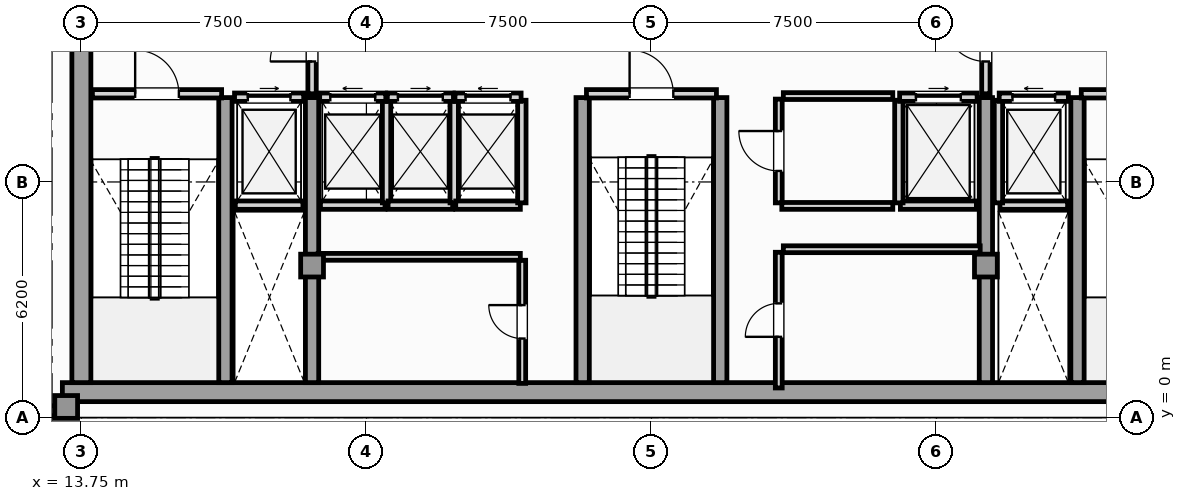
"""IFC4 building model, lengths in metres.
Left out: names, types, materials, properties, quantities, classifications, styles, units other than length and angle.
Written with IfcOpenShell. Run it as: python <this file> out.ifc"""

import sys

from ifc_helpers import new_model, si_unit, direction, frame, frame_2d, origin, origin_2d, place, context, subcontext, project, spatial, rectangle, extrude, element, fill, save


model = new_model("IFC4")
c1 = context("Model", 3, precision=1e-05, world=origin(), true_north=direction((0.0, 1.0)))
c2 = subcontext(c1, "Body", "Model", "MODEL_VIEW")
j1 = project(units=[si_unit("LENGTHUNIT", "METRE"), si_unit("PLANEANGLEUNIT", "RADIAN")], contexts=[c1])
p1 = place(None, origin())
s1 = spatial("IfcSite", under=j1, at=p1, CompositionType="ELEMENT")
p2 = place(p1, origin())
s2 = spatial("IfcBuilding", under=s1, at=p2, CompositionType="ELEMENT")
p3 = place(p2, frame((0.0, 0.0, 308.0)))
s3 = spatial("IfcBuildingStorey", under=s2, at=p3, CompositionType="ELEMENT", Elevation=308.0)
p4 = place(p3, frame((13.25, 0.67, 0.0), z_axis=(0.0, 0.0, 1.0), x_axis=(1.0, 0.0, 0.0)))
e1 = element("IfcWall", 1, at=p4, inside=s3, PredefinedType="SHEAR", context=c2, shape_type="SweptSolid", body=[
    extrude(rectangle(XDim=31.0, YDim=0.5, at=frame_2d((15.5, 0.0))), origin(), (0.0, 0.0, 1.0), 4.85),
])
p5 = place(p3, frame((13.75, 0.92, 0.0), z_axis=(0.0, 0.0, 1.0), x_axis=(0.0, 1.0, 0.0)))
e2 = element("IfcWall", 2, at=p5, inside=s3, PredefinedType="SHEAR", context=c2, shape_type="SweptSolid", body=[
    extrude(rectangle(XDim=10.53, YDim=0.5, at=frame_2d((5.265, 0.0))), origin(), (0.0, 0.0, 1.0), 4.85),
])
for number, where, z_axis, x_axis in (
    (3, (17.54, 0.92, 0.0), (0.0, 0.0, 1.0), (0.0, 1.0, 0.0)),
    (4, (19.82, 0.92, 0.0), (0.0, 0.0, 1.0), (0.0, 1.0, 0.0)),
    (5, (26.94, 0.92, 0.0), (0.0, 0.0, 1.0), (0.0, 1.0, 0.0)),
    (6, (30.56, 0.92, 0.0), (0.0, 0.0, 1.0), (0.0, 1.0, 0.0)),
    (7, (37.55, 0.92, 0.0), (0.0, 0.0, 1.0), (0.0, 1.0, 0.0)),
    (8, (39.96, 0.92, 0.0), (0.0, 0.0, 1.0), (0.0, 1.0, 0.0)),
):
    element("IfcWall", number, at=place(p3, frame(where, z_axis=z_axis, x_axis=x_axis)), inside=s3, PredefinedType="SHEAR", context=c2, shape_type="SweptSolid", body=[
        extrude(rectangle(XDim=7.5, YDim=0.35, at=frame_2d((3.75, 0.0))), origin(), (0.0, 0.0, 1.0), 4.85),
    ])
for number, where, z_axis, x_axis in (
    (9, (13.35, 0.28, 0.0), (0.0, 0.0, 1.0), (1.0, 0.0, 0.0)),
    (10, (19.82, 4.0, 0.0), (0.0, 0.0, 1.0), (1.0, 0.0, 0.0)),
    (11, (37.55, 4.0, 0.0), (0.0, 0.0, 1.0), (1.0, 0.0, 0.0)),
):
    element("IfcColumn", number, at=place(p3, frame(where, z_axis=z_axis, x_axis=x_axis)), inside=s3, PredefinedType="COLUMN", context=c2, shape_type="SweptSolid", body=[
        extrude(rectangle(XDim=0.6, YDim=0.6, at=origin_2d()), origin(), (0.0, 0.0, 1.0), 5.05),
    ])
p6 = place(p3, frame((12.091, 0.18, 0.0), z_axis=(0.0, 0.0, 1.0), x_axis=(1.0, 0.0, 0.0)))
e12 = element("IfcWall", 12, at=p6, inside=s3, PredefinedType="SOLIDWALL", context=c2, shape_type="SweptSolid", body=[
    extrude(rectangle(XDim=1.159, YDim=0.26, at=frame_2d((0.58, 0.0))), origin(), (0.0, 0.0, 1.0), 4.85),
])
p7 = place(p3, frame((17.8, 5.59, 0.0), z_axis=(0.0, 0.0, 1.0), x_axis=(1.0, 0.0, 0.0)))
e13 = element("IfcWall", 13, at=p7, inside=s3, PredefinedType="SOLIDWALL", context=c2, shape_type="SweptSolid", body=[
    extrude(rectangle(XDim=1.78, YDim=0.22, at=frame_2d((0.89, 0.0))), origin(), (0.0, 0.0, 1.0), 4.85),
])
p8 = place(p3, frame((17.78, 8.43, 0.0), z_axis=(0.0, 0.0, 1.0), x_axis=(1.0, 0.0, 0.0)))
e14 = element("IfcWall", 14, at=p8, inside=s3, PredefinedType="SOLIDWALL", context=c2, shape_type="SweptSolid", body=[
    extrude(rectangle(XDim=1.82, YDim=0.22, at=frame_2d((0.91, 0.0))), origin(), (0.0, 0.0, 1.0), 4.85),
])
p9 = place(p8, frame((0.35, 0.0, 0.0)))
e15 = element("IfcOpeningElement", 15, at=p9, cuts=e14, PredefinedType="OPENING", context=c2, shape_type="SweptSolid", body=[
    extrude(rectangle(XDim=1.12, YDim=2.25, at=frame_2d((0.56, 1.125))), frame((0.0, 0.12, 0.0), z_axis=(0.0, -1.0, 0.0), x_axis=(1.0, 0.0, 0.0)), (0.0, 0.0, 1.0), 0.24),
])
p10 = place(p3, frame((37.92, 5.59, 0.0), z_axis=(0.0, 0.0, 1.0), x_axis=(1.0, 0.0, 0.0)))
e16 = element("IfcWall", 16, at=p10, inside=s3, PredefinedType="SOLIDWALL", context=c2, shape_type="SweptSolid", body=[
    extrude(rectangle(XDim=1.78, YDim=0.22, at=frame_2d((0.89, 0.0))), origin(), (0.0, 0.0, 1.0), 4.85),
])
p11 = place(p3, frame((37.88, 5.65, 0.0), z_axis=(0.0, 0.0, 1.0), x_axis=(0.0, 1.0, 0.0)))
e17 = element("IfcWall", 17, at=p11, inside=s3, PredefinedType="SOLIDWALL", context=c2, shape_type="SweptSolid", body=[
    extrude(rectangle(XDim=2.7, YDim=0.22, at=frame_2d((1.35, 0.0))), origin(), (0.0, 0.0, 1.0), 4.85),
])
p12 = place(p3, frame((37.9, 8.43, 0.0), z_axis=(0.0, 0.0, 1.0), x_axis=(1.0, 0.0, 0.0)))
e18 = element("IfcWall", 18, at=p12, inside=s3, PredefinedType="SOLIDWALL", context=c2, shape_type="SweptSolid", body=[
    extrude(rectangle(XDim=1.82, YDim=0.22, at=frame_2d((0.91, 0.0))), origin(), (0.0, 0.0, 1.0), 4.85),
])
p13 = place(p12, frame((0.35, 0.0, 0.0)))
e19 = element("IfcOpeningElement", 19, at=p13, cuts=e18, PredefinedType="OPENING", context=c2, shape_type="SweptSolid", body=[
    extrude(rectangle(XDim=1.12, YDim=2.25, at=frame_2d((0.56, 1.125))), frame((0.0, 0.12, 0.0), z_axis=(0.0, -1.0, 0.0), x_axis=(1.0, 0.0, 0.0)), (0.0, 0.0, 1.0), 0.24),
])
p14 = place(p3, frame((35.3, 5.59, 0.0), z_axis=(0.0, 0.0, 1.0), x_axis=(1.0, 0.0, 0.0)))
e20 = element("IfcWall", 20, at=p14, inside=s3, PredefinedType="SOLIDWALL", context=c2, shape_type="SweptSolid", body=[
    extrude(rectangle(XDim=2.0, YDim=0.22, at=frame_2d((1.0, 0.0))), origin(), (0.0, 0.0, 1.0), 4.85),
])
p15 = place(p3, frame((35.26, 5.65, 0.0), z_axis=(0.0, 0.0, 1.0), x_axis=(0.0, 1.0, 0.0)))
e21 = element("IfcWall", 21, at=p15, inside=s3, PredefinedType="SOLIDWALL", context=c2, shape_type="SweptSolid", body=[
    extrude(rectangle(XDim=2.7, YDim=0.22, at=frame_2d((1.35, 0.0))), origin(), (0.0, 0.0, 1.0), 4.85),
])
p16 = place(p3, frame((35.28, 8.43, 0.0), z_axis=(0.0, 0.0, 1.0), x_axis=(1.0, 0.0, 0.0)))
e22 = element("IfcWall", 22, at=p16, inside=s3, PredefinedType="SOLIDWALL", context=c2, shape_type="SweptSolid", body=[
    extrude(rectangle(XDim=2.04, YDim=0.22, at=frame_2d((1.02, 0.0))), origin(), (0.0, 0.0, 1.0), 4.85),
])
p17 = place(p16, frame((0.43, 0.0, 0.0)))
e23 = element("IfcOpeningElement", 23, at=p17, cuts=e22, PredefinedType="OPENING", context=c2, shape_type="SweptSolid", body=[
    extrude(rectangle(XDim=1.18, YDim=2.2, at=frame_2d((0.59, 1.1))), frame((0.0, 0.12, 0.0), z_axis=(0.0, -1.0, 0.0), x_axis=(1.0, 0.0, 0.0)), (0.0, 0.0, 1.0), 0.24),
])
p18 = place(p3, frame((20.04, 5.59, 0.0), z_axis=(0.0, 0.0, 1.0), x_axis=(1.0, 0.0, 0.0)))
e24 = element("IfcWall", 24, at=p18, inside=s3, PredefinedType="SOLIDWALL", context=c2, shape_type="SweptSolid", body=[
    extrude(rectangle(XDim=1.7, YDim=0.22, at=frame_2d((0.85, 0.0))), origin(), (0.0, 0.0, 1.0), 4.85),
])
p19 = place(p3, frame((21.78, 5.65, 0.0), z_axis=(0.0, 0.0, 1.0), x_axis=(0.0, 1.0, 0.0)))
e25 = element("IfcWall", 25, at=p19, inside=s3, PredefinedType="SOLIDWALL", context=c2, shape_type="SweptSolid", body=[
    extrude(rectangle(XDim=2.7, YDim=0.22, at=frame_2d((1.35, 0.0))), origin(), (0.0, 0.0, 1.0), 4.85),
])
p20 = place(p3, frame((20.02, 8.43, 0.0), z_axis=(0.0, 0.0, 1.0), x_axis=(1.0, 0.0, 0.0)))
e26 = element("IfcWall", 26, at=p20, inside=s3, PredefinedType="SOLIDWALL", context=c2, shape_type="SweptSolid", body=[
    extrude(rectangle(XDim=1.74, YDim=0.22, at=frame_2d((0.87, 0.0))), origin(), (0.0, 0.0, 1.0), 4.85),
])
p21 = place(p20, frame((0.28, 0.0, 0.0)))
e27 = element("IfcOpeningElement", 27, at=p21, cuts=e26, PredefinedType="OPENING", context=c2, shape_type="SweptSolid", body=[
    extrude(rectangle(XDim=1.18, YDim=2.2, at=frame_2d((0.59, 1.1))), frame((0.0, 0.12, 0.0), z_axis=(0.0, -1.0, 0.0), x_axis=(1.0, 0.0, 0.0)), (0.0, 0.0, 1.0), 0.24),
])
p22 = place(p3, frame((21.82, 5.59, 0.0), z_axis=(0.0, 0.0, 1.0), x_axis=(1.0, 0.0, 0.0)))
e28 = element("IfcWall", 28, at=p22, inside=s3, PredefinedType="SOLIDWALL", context=c2, shape_type="SweptSolid", body=[
    extrude(rectangle(XDim=1.7, YDim=0.22, at=frame_2d((0.85, 0.0))), origin(), (0.0, 0.0, 1.0), 4.85),
])
p23 = place(p3, frame((23.56, 5.65, 0.0), z_axis=(0.0, 0.0, 1.0), x_axis=(0.0, 1.0, 0.0)))
e29 = element("IfcWall", 29, at=p23, inside=s3, PredefinedType="SOLIDWALL", context=c2, shape_type="SweptSolid", body=[
    extrude(rectangle(XDim=2.7, YDim=0.22, at=frame_2d((1.35, 0.0))), origin(), (0.0, 0.0, 1.0), 4.85),
])
p24 = place(p3, frame((21.8, 8.43, 0.0), z_axis=(0.0, 0.0, 1.0), x_axis=(1.0, 0.0, 0.0)))
e30 = element("IfcWall", 30, at=p24, inside=s3, PredefinedType="SOLIDWALL", context=c2, shape_type="SweptSolid", body=[
    extrude(rectangle(XDim=1.74, YDim=0.22, at=frame_2d((0.87, 0.0))), origin(), (0.0, 0.0, 1.0), 4.85),
])
p25 = place(p24, frame((0.28, 0.0, 0.0)))
e31 = element("IfcOpeningElement", 31, at=p25, cuts=e30, PredefinedType="OPENING", context=c2, shape_type="SweptSolid", body=[
    extrude(rectangle(XDim=1.18, YDim=2.2, at=frame_2d((0.59, 1.1))), frame((0.0, 0.12, 0.0), z_axis=(0.0, -1.0, 0.0), x_axis=(1.0, 0.0, 0.0)), (0.0, 0.0, 1.0), 0.24),
])
p26 = place(p3, frame((23.6, 5.59, 0.0), z_axis=(0.0, 0.0, 1.0), x_axis=(1.0, 0.0, 0.0)))
e32 = element("IfcWall", 32, at=p26, inside=s3, PredefinedType="SOLIDWALL", context=c2, shape_type="SweptSolid", body=[
    extrude(rectangle(XDim=1.7, YDim=0.22, at=frame_2d((0.85, 0.0))), origin(), (0.0, 0.0, 1.0), 4.85),
])
p27 = place(p3, frame((25.34, 5.65, 0.0), z_axis=(0.0, 0.0, 1.0), x_axis=(0.0, 1.0, 0.0)))
e33 = element("IfcWall", 33, at=p27, inside=s3, PredefinedType="SOLIDWALL", context=c2, shape_type="SweptSolid", body=[
    extrude(rectangle(XDim=2.7, YDim=0.22, at=frame_2d((1.35, 0.0))), origin(), (0.0, 0.0, 1.0), 4.85),
])
p28 = place(p3, frame((23.58, 8.43, 0.0), z_axis=(0.0, 0.0, 1.0), x_axis=(1.0, 0.0, 0.0)))
e34 = element("IfcWall", 34, at=p28, inside=s3, PredefinedType="SOLIDWALL", context=c2, shape_type="SweptSolid", body=[
    extrude(rectangle(XDim=1.74, YDim=0.22, at=frame_2d((0.87, 0.0))), origin(), (0.0, 0.0, 1.0), 4.85),
])
p29 = place(p28, frame((0.28, 0.0, 0.0)))
e35 = element("IfcOpeningElement", 35, at=p29, cuts=e34, PredefinedType="OPENING", context=c2, shape_type="SweptSolid", body=[
    extrude(rectangle(XDim=1.18, YDim=2.2, at=frame_2d((0.59, 1.1))), frame((0.0, 0.12, 0.0), z_axis=(0.0, -1.0, 0.0), x_axis=(1.0, 0.0, 0.0)), (0.0, 0.0, 1.0), 0.24),
])
p30 = place(p3, frame((14.04, 8.52, 0.0), z_axis=(0.0, 0.0, 1.0), x_axis=(1.0, 0.0, 0.0)))
e36 = element("IfcWall", 36, at=p30, inside=s3, PredefinedType="SOLIDWALL", context=c2, shape_type="SweptSolid", body=[
    extrude(rectangle(XDim=3.4, YDim=0.22, at=frame_2d((1.7, 0.0))), origin(), (0.0, 0.0, 1.0), 4.85),
])
p31 = place(p30, frame((1.125, 0.0, 0.0)))
e37 = element("IfcOpeningElement", 37, at=p31, cuts=e36, PredefinedType="OPENING", context=c2, shape_type="SweptSolid", body=[
    extrude(rectangle(XDim=1.15, YDim=2.2, at=frame_2d((0.575, 1.1))), frame((0.0, 0.12, 0.0), z_axis=(0.0, -1.0, 0.0), x_axis=(1.0, 0.0, 0.0)), (0.0, 0.0, 1.0), 0.24),
])
p32 = place(p3, frame((40.06, 8.52, 0.0), z_axis=(0.0, 0.0, 1.0), x_axis=(1.0, 0.0, 0.0)))
e38 = element("IfcWall", 38, at=p32, inside=s3, PredefinedType="SOLIDWALL", context=c2, shape_type="SweptSolid", body=[
    extrude(rectangle(XDim=3.4, YDim=0.22, at=frame_2d((1.7, 0.0))), origin(), (0.0, 0.0, 1.0), 4.85),
])
p33 = place(p32, frame((1.125, 0.0, 0.0)))
e39 = element("IfcOpeningElement", 39, at=p33, cuts=e38, PredefinedType="OPENING", context=c2, shape_type="SweptSolid", body=[
    extrude(rectangle(XDim=1.15, YDim=2.2, at=frame_2d((0.575, 1.1))), frame((0.0, 0.12, 0.0), z_axis=(0.0, -1.0, 0.0), x_axis=(1.0, 0.0, 0.0)), (0.0, 0.0, 1.0), 0.24),
])
p34 = place(p3, frame((27.04, 8.52, 0.0), z_axis=(0.0, 0.0, 1.0), x_axis=(1.0, 0.0, 0.0)))
e40 = element("IfcWall", 40, at=p34, inside=s3, PredefinedType="SOLIDWALL", context=c2, shape_type="SweptSolid", body=[
    extrude(rectangle(XDim=3.42, YDim=0.22, at=frame_2d((1.71, 0.0))), origin(), (0.0, 0.0, 1.0), 4.85),
])
p35 = place(p34, frame((1.135, 0.0, 0.0)))
e41 = element("IfcOpeningElement", 41, at=p35, cuts=e40, PredefinedType="OPENING", context=c2, shape_type="SweptSolid", body=[
    extrude(rectangle(XDim=1.15, YDim=2.2, at=frame_2d((0.575, 1.1))), frame((0.0, 0.12, 0.0), z_axis=(0.0, -1.0, 0.0), x_axis=(1.0, 0.0, 0.0)), (0.0, 0.0, 1.0), 0.24),
])
p36 = place(p3, frame((19.82, 8.52, 0.0), z_axis=(0.0, 0.0, 1.0), x_axis=(0.0, 1.0, 0.0)))
e42 = element("IfcWall", 42, at=p36, inside=s3, PredefinedType="SOLIDWALL", context=c2, shape_type="SweptSolid", body=[
    extrude(rectangle(XDim=2.8, YDim=0.22, at=frame_2d((1.4, 0.0))), origin(), (0.0, 0.0, 1.0), 4.305),
])
p37 = place(p36, frame((0.85, 0.0, 0.0)))
e43 = element("IfcOpeningElement", 43, at=p37, cuts=e42, PredefinedType="OPENING", context=c2, shape_type="SweptSolid", body=[
    extrude(rectangle(XDim=1.1, YDim=2.2, at=frame_2d((0.55, 1.1))), frame((0.0, 0.12, 0.0), z_axis=(0.0, -1.0, 0.0), x_axis=(1.0, 0.0, 0.0)), (0.0, 0.0, 1.0), 0.24),
])
p38 = place(p3, frame((37.55, 8.52, 0.0), z_axis=(0.0, 0.0, 1.0), x_axis=(0.0, 1.0, 0.0)))
e44 = element("IfcWall", 44, at=p38, inside=s3, PredefinedType="SOLIDWALL", context=c2, shape_type="SweptSolid", body=[
    extrude(rectangle(XDim=2.8, YDim=0.22, at=frame_2d((1.4, 0.0))), origin(), (0.0, 0.0, 1.0), 4.305),
])
p39 = place(p38, frame((0.85, 0.0, 0.0)))
e45 = element("IfcOpeningElement", 45, at=p39, cuts=e44, PredefinedType="OPENING", context=c2, shape_type="SweptSolid", body=[
    extrude(rectangle(XDim=1.1, YDim=2.2, at=frame_2d((0.55, 1.1))), frame((0.0, 0.12, 0.0), z_axis=(0.0, -1.0, 0.0), x_axis=(1.0, 0.0, 0.0)), (0.0, 0.0, 1.0), 0.24),
])
p40 = place(p3, frame((25.35, 0.9, 0.0), z_axis=(0.0, 0.0, 1.0), x_axis=(0.0, 1.0, 0.0)))
e46 = element("IfcWall", 46, at=p40, inside=s3, PredefinedType="PARTITIONING", context=c2, shape_type="SweptSolid", body=[
    extrude(rectangle(XDim=3.24, YDim=0.18, at=frame_2d((1.62, 0.0))), origin(), (0.0, 0.0, 1.0), 4.85),
])
p41 = place(p40, frame((1.18, 0.0, 0.0)))
e47 = element("IfcOpeningElement", 47, at=p41, cuts=e46, PredefinedType="OPENING", context=c2, shape_type="SweptSolid", body=[
    extrude(rectangle(XDim=0.88, YDim=2.05, at=frame_2d((0.44, 1.025))), frame((0.0, 0.1, 0.0), z_axis=(0.0, -1.0, 0.0), x_axis=(1.0, 0.0, 0.0)), (0.0, 0.0, 1.0), 0.2),
])
p42 = place(p3, frame((19.98, 4.23, 0.0), z_axis=(0.0, 0.0, 1.0), x_axis=(1.0, 0.0, 0.0)))
e48 = element("IfcWall", 48, at=p42, inside=s3, PredefinedType="PARTITIONING", context=c2, shape_type="SweptSolid", body=[
    extrude(rectangle(XDim=5.32, YDim=0.18, at=frame_2d((2.66, 0.0))), origin(), (0.0, 0.0, 1.0), 4.85),
])
p43 = place(p3, frame((32.1, 0.78, 0.0), z_axis=(0.0, 0.0, 1.0), x_axis=(0.0, 1.0, 0.0)))
e49 = element("IfcWall", 49, at=p43, inside=s3, PredefinedType="PARTITIONING", context=c2, shape_type="SweptSolid", body=[
    extrude(rectangle(XDim=3.57, YDim=0.18, at=frame_2d((1.785, 0.0))), origin(), (0.0, 0.0, 1.0), 4.85),
])
p44 = place(p43, frame((1.345, 0.0, 0.0)))
e50 = element("IfcOpeningElement", 50, at=p44, cuts=e49, PredefinedType="OPENING", context=c2, shape_type="SweptSolid", body=[
    extrude(rectangle(XDim=0.88, YDim=2.05, at=frame_2d((0.44, 1.025))), frame((0.0, 0.1, 0.0), z_axis=(0.0, -1.0, 0.0), x_axis=(1.0, 0.0, 0.0)), (0.0, 0.0, 1.0), 0.2),
])
p45 = place(p3, frame((32.22, 4.43, 0.0), z_axis=(0.0, 0.0, 1.0), x_axis=(1.0, 0.0, 0.0)))
e51 = element("IfcWall", 51, at=p45, inside=s3, PredefinedType="PARTITIONING", context=c2, shape_type="SweptSolid", body=[
    extrude(rectangle(XDim=5.18, YDim=0.18, at=frame_2d((2.59, 0.0))), origin(), (0.0, 0.0, 1.0), 4.85),
])
p46 = place(p3, frame((32.1, 5.65, 0.0), z_axis=(0.0, 0.0, 1.0), x_axis=(0.0, 1.0, 0.0)))
e52 = element("IfcWall", 52, at=p46, inside=s3, PredefinedType="PARTITIONING", context=c2, shape_type="SweptSolid", body=[
    extrude(rectangle(XDim=2.73, YDim=0.18, at=frame_2d((1.365, 0.0))), origin(), (0.0, 0.0, 1.0), 4.85),
])
p47 = place(p46, frame((0.84, 0.0, 0.0)))
e53 = element("IfcOpeningElement", 53, at=p47, cuts=e52, PredefinedType="OPENING", context=c2, shape_type="SweptSolid", body=[
    extrude(rectangle(XDim=1.05, YDim=2.15, at=frame_2d((0.525, 1.075))), frame((0.0, 0.1, 0.0), z_axis=(0.0, -1.0, 0.0), x_axis=(1.0, 0.0, 0.0)), (0.0, 0.0, 1.0), 0.2),
])
p48 = place(p3, frame((32.22, 8.46, 0.0), z_axis=(0.0, 0.0, 1.0), x_axis=(1.0, 0.0, 0.0)))
e54 = element("IfcWall", 54, at=p48, inside=s3, PredefinedType="PARTITIONING", context=c2, shape_type="SweptSolid", body=[
    extrude(rectangle(XDim=2.88, YDim=0.18, at=frame_2d((1.44, 0.0))), origin(), (0.0, 0.0, 1.0), 4.85),
])
p49 = place(p3, frame((32.18, 5.57, 0.0), z_axis=(0.0, 0.0, 1.0), x_axis=(1.0, 0.0, 0.0)))
e55 = element("IfcWall", 55, at=p49, inside=s3, PredefinedType="PARTITIONING", context=c2, shape_type="SweptSolid", body=[
    extrude(rectangle(XDim=2.92, YDim=0.18, at=frame_2d((1.46, 0.0))), origin(), (0.0, 0.0, 1.0), 4.85),
])
p50 = place(p9, origin())
e56 = element("IfcDoor", 56, at=p50, inside=s3, OperationType="SLIDING_TO_RIGHT", PredefinedType="DOOR", context=c2, shape_type="SweptSolid", body=[
    extrude(rectangle(XDim=1.12, YDim=2.25, at=frame_2d((0.56, 1.125))), frame((0.0, 0.025, 0.0), z_axis=(0.0, -1.0, 0.0), x_axis=(1.0, 0.0, 0.0)), (0.0, 0.0, 1.0), 0.05),
])
fill(e15, e56)
p51 = place(p13, origin())
e57 = element("IfcDoor", 57, at=p51, inside=s3, OperationType="SLIDING_TO_LEFT", PredefinedType="DOOR", context=c2, shape_type="SweptSolid", body=[
    extrude(rectangle(XDim=1.12, YDim=2.25, at=frame_2d((0.56, 1.125))), frame((0.0, 0.025, 0.0), z_axis=(0.0, -1.0, 0.0), x_axis=(1.0, 0.0, 0.0)), (0.0, 0.0, 1.0), 0.05),
])
fill(e19, e57)
p52 = place(p17, origin())
e58 = element("IfcDoor", 58, at=p52, inside=s3, OperationType="SLIDING_TO_RIGHT", PredefinedType="DOOR", context=c2, shape_type="SweptSolid", body=[
    extrude(rectangle(XDim=1.18, YDim=2.2, at=frame_2d((0.59, 1.1))), frame((0.0, 0.025, 0.0), z_axis=(0.0, -1.0, 0.0), x_axis=(1.0, 0.0, 0.0)), (0.0, 0.0, 1.0), 0.05),
])
fill(e23, e58)
p53 = place(p21, origin())
e59 = element("IfcDoor", 59, at=p53, inside=s3, OperationType="SLIDING_TO_LEFT", PredefinedType="DOOR", context=c2, shape_type="SweptSolid", body=[
    extrude(rectangle(XDim=1.18, YDim=2.2, at=frame_2d((0.59, 1.1))), frame((0.0, 0.025, 0.0), z_axis=(0.0, -1.0, 0.0), x_axis=(1.0, 0.0, 0.0)), (0.0, 0.0, 1.0), 0.05),
])
fill(e27, e59)
p54 = place(p25, origin())
e60 = element("IfcDoor", 60, at=p54, inside=s3, OperationType="SLIDING_TO_RIGHT", PredefinedType="DOOR", context=c2, shape_type="SweptSolid", body=[
    extrude(rectangle(XDim=1.18, YDim=2.2, at=frame_2d((0.59, 1.1))), frame((0.0, 0.025, 0.0), z_axis=(0.0, -1.0, 0.0), x_axis=(1.0, 0.0, 0.0)), (0.0, 0.0, 1.0), 0.05),
])
fill(e31, e60)
p55 = place(p29, origin())
e61 = element("IfcDoor", 61, at=p55, inside=s3, OperationType="SLIDING_TO_LEFT", PredefinedType="DOOR", context=c2, shape_type="SweptSolid", body=[
    extrude(rectangle(XDim=1.18, YDim=2.2, at=frame_2d((0.59, 1.1))), frame((0.0, 0.025, 0.0), z_axis=(0.0, -1.0, 0.0), x_axis=(1.0, 0.0, 0.0)), (0.0, 0.0, 1.0), 0.05),
])
fill(e35, e61)
p56 = place(p31, origin())
e62 = element("IfcDoor", 62, at=p56, inside=s3, OperationType="SINGLE_SWING_LEFT", PredefinedType="DOOR", context=c2, shape_type="SweptSolid", body=[
    extrude(rectangle(XDim=1.15, YDim=2.2, at=frame_2d((0.575, 1.1))), frame((0.0, 0.025, 0.0), z_axis=(0.0, -1.0, 0.0), x_axis=(1.0, 0.0, 0.0)), (0.0, 0.0, 1.0), 0.05),
])
fill(e37, e62)
p57 = place(p35, origin())
e63 = element("IfcDoor", 63, at=p57, inside=s3, OperationType="SINGLE_SWING_LEFT", PredefinedType="DOOR", context=c2, shape_type="SweptSolid", body=[
    extrude(rectangle(XDim=1.15, YDim=2.2, at=frame_2d((0.575, 1.1))), frame((0.0, 0.025, 0.0), z_axis=(0.0, -1.0, 0.0), x_axis=(1.0, 0.0, 0.0)), (0.0, 0.0, 1.0), 0.05),
])
fill(e41, e63)
p58 = place(p37, origin())
e64 = element("IfcDoor", 64, at=p58, inside=s3, OperationType="SINGLE_SWING_LEFT", PredefinedType="DOOR", context=c2, shape_type="SweptSolid", body=[
    extrude(rectangle(XDim=1.1, YDim=2.2, at=frame_2d((0.55, 1.1))), frame((0.0, 0.025, 0.0), z_axis=(0.0, -1.0, 0.0), x_axis=(1.0, 0.0, 0.0)), (0.0, 0.0, 1.0), 0.05),
])
fill(e43, e64)
p59 = place(p39, origin())
e65 = element("IfcDoor", 65, at=p59, inside=s3, OperationType="SINGLE_SWING_RIGHT", PredefinedType="DOOR", context=c2, shape_type="SweptSolid", body=[
    extrude(rectangle(XDim=1.1, YDim=2.2, at=frame_2d((0.55, 1.1))), frame((0.0, 0.025, 0.0), z_axis=(0.0, -1.0, 0.0), x_axis=(1.0, 0.0, 0.0)), (0.0, 0.0, 1.0), 0.05),
])
fill(e45, e65)
p60 = place(p41, origin())
e66 = element("IfcDoor", 66, at=p60, inside=s3, OperationType="SINGLE_SWING_RIGHT", PredefinedType="DOOR", context=c2, shape_type="SweptSolid", body=[
    extrude(rectangle(XDim=0.88, YDim=2.05, at=frame_2d((0.44, 1.025))), frame((0.0, 0.025, 0.0), z_axis=(0.0, -1.0, 0.0), x_axis=(1.0, 0.0, 0.0)), (0.0, 0.0, 1.0), 0.05),
])
fill(e47, e66)
p61 = place(p44, origin())
e67 = element("IfcDoor", 67, at=p61, inside=s3, OperationType="SINGLE_SWING_LEFT", PredefinedType="DOOR", context=c2, shape_type="SweptSolid", body=[
    extrude(rectangle(XDim=0.88, YDim=2.05, at=frame_2d((0.44, 1.025))), frame((0.0, 0.025, 0.0), z_axis=(0.0, -1.0, 0.0), x_axis=(1.0, 0.0, 0.0)), (0.0, 0.0, 1.0), 0.05),
])
fill(e50, e67)
p62 = place(p47, origin())
e68 = element("IfcDoor", 68, at=p62, inside=s3, OperationType="SINGLE_SWING_RIGHT", PredefinedType="DOOR", context=c2, shape_type="SweptSolid", body=[
    extrude(rectangle(XDim=1.05, YDim=2.15, at=frame_2d((0.525, 1.075))), frame((0.0, 0.025, 0.0), z_axis=(0.0, -1.0, 0.0), x_axis=(1.0, 0.0, 0.0)), (0.0, 0.0, 1.0), 0.05),
])
fill(e53, e68)
save(model, sys.argv[1])
